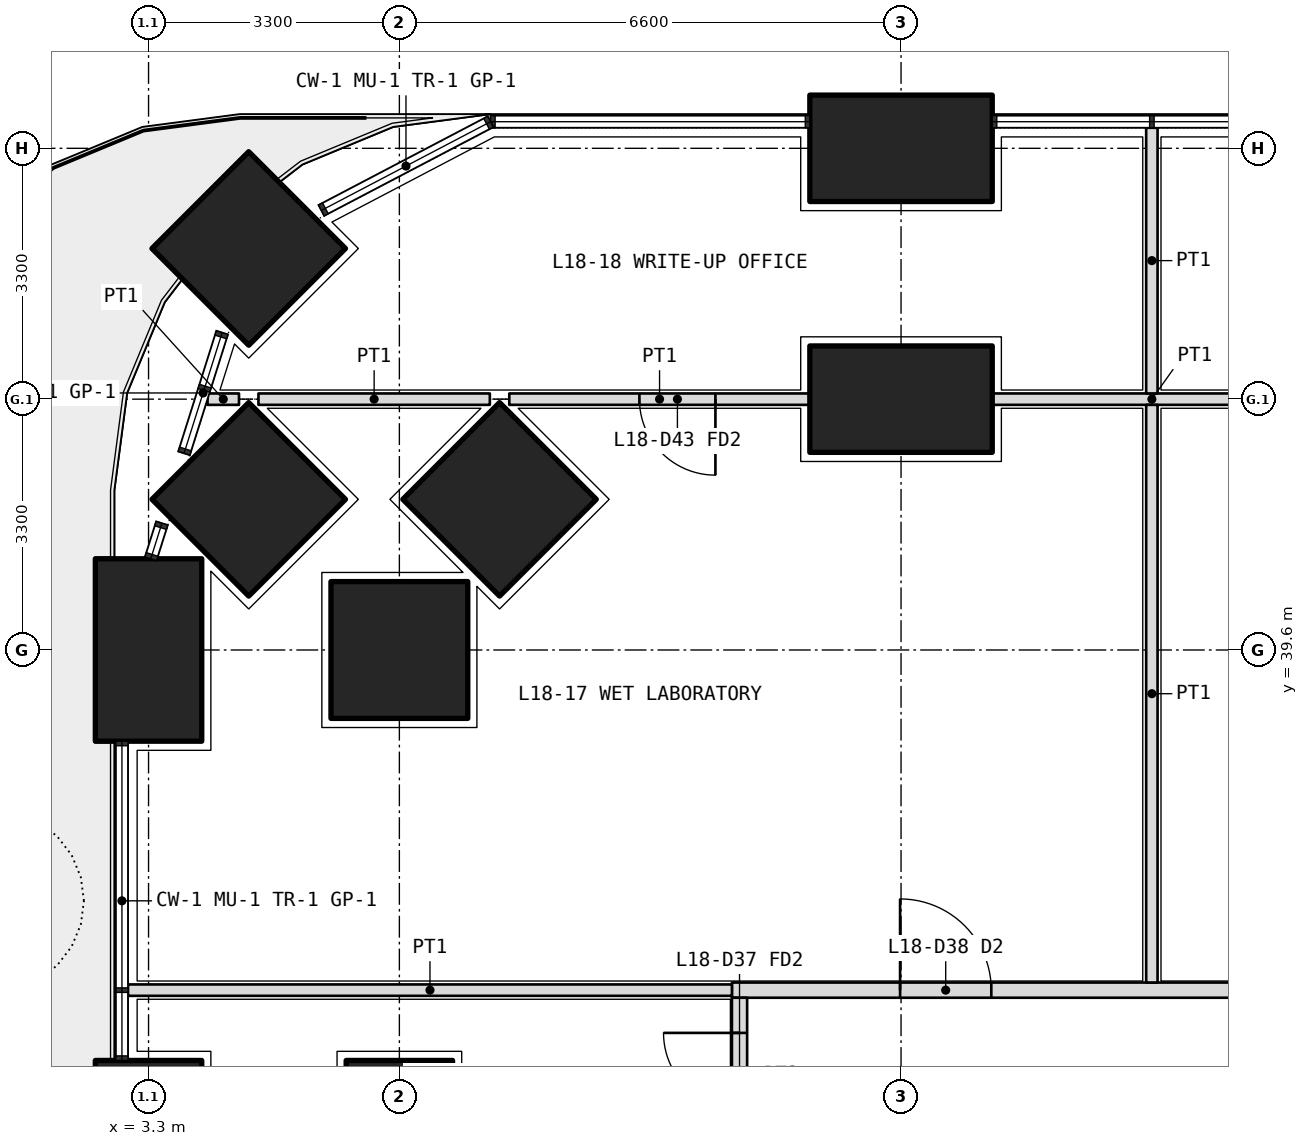
"""IFC4 building model, lengths in metres.
Left out: names, types, materials, properties, quantities, classifications, styles, units other than length and angle.
Written with IfcOpenShell. Run it as: python <this file> out.ifc"""

import sys

from ifc_helpers import new_model, si_unit, direction, frame, frame_2d, origin, origin_2d, place, context, subcontext, project, spatial, rectangle, extrude, element, fill, save


model = new_model("IFC4")
c1 = context("Model", 3, precision=1e-05, world=origin(), true_north=direction((0.0, 1.0)))
c2 = subcontext(c1, "Body", "Model", "MODEL_VIEW")
j1 = project(units=[si_unit("LENGTHUNIT", "METRE"), si_unit("PLANEANGLEUNIT", "RADIAN")], contexts=[c1])
p1 = place(None, origin())
s1 = spatial("IfcSite", under=j1, at=p1, CompositionType="ELEMENT")
p2 = place(p1, origin())
s2 = spatial("IfcBuilding", under=s1, at=p2, CompositionType="ELEMENT")
p3 = place(p2, frame((0.0, 0.0, 82.2)))
s3 = spatial("IfcBuildingStorey", under=s2, at=p3, CompositionType="ELEMENT", Elevation=82.2)
p4 = place(p3, frame((4.618, 44.882, 0.0), z_axis=(0.0, 0.0, 1.0), x_axis=(0.707106781187, 0.707106781187, 0.0)))
e1 = element("IfcColumn", 1, at=p4, inside=s3, PredefinedType="COLUMN", context=c2, shape_type="SweptSolid", body=[
    extrude(rectangle(XDim=1.8, YDim=1.8, at=origin_2d()), origin(), (0.0, 0.0, 1.0), 4.2),
])
for number, where, z_axis, x_axis in (
    (2, (3.3, 33.0, 0.0), (0.0, 0.0, 1.0), (0.0, 1.0, 0.0)),
    (3, (3.3, 39.6, 0.0), (0.0, 0.0, 1.0), (0.0, 1.0, 0.0)),
    (4, (13.2, 46.2, 0.0), (0.0, 0.0, 1.0), (1.0, 0.0, 0.0)),
):
    element("IfcColumn", number, at=place(p3, frame(where, z_axis=z_axis, x_axis=x_axis)), inside=s3, PredefinedType="COLUMN", context=c2, shape_type="SweptSolid", body=[
        extrude(rectangle(XDim=2.4, YDim=1.4, at=origin_2d()), origin(), (0.0, 0.0, 1.0), 4.2),
    ])
for number, where, z_axis, x_axis in (
    (5, (6.6, 39.6, 0.0), (0.0, 0.0, 1.0), (1.0, 0.0, 0.0)),
    (6, (4.618, 41.582, 0.0), (0.0, 0.0, 1.0), (0.707, 0.707, 0.0)),
):
    element("IfcColumn", number, at=place(p3, frame(where, z_axis=z_axis, x_axis=x_axis)), inside=s3, PredefinedType="COLUMN", context=c2, shape_type="SweptSolid", body=[
        extrude(rectangle(XDim=1.8, YDim=1.8, at=origin_2d()), origin(), (0.0, 0.0, 1.0), 4.2),
    ])
p5 = place(p3, frame((13.2, 42.9, 0.0), z_axis=(0.0, 0.0, 1.0), x_axis=(1.0, 0.0, 0.0)))
e7 = element("IfcColumn", 7, at=p5, inside=s3, PredefinedType="COLUMN", context=c2, shape_type="SweptSolid", body=[
    extrude(rectangle(XDim=2.4, YDim=1.4, at=origin_2d()), origin(), (0.0, 0.0, 1.0), 4.2),
])
p6 = place(p3, frame((7.918, 41.582, 0.0), z_axis=(0.0, 0.0, 1.0), x_axis=(0.707106781187, 0.707106781187, 0.0)))
e8 = element("IfcColumn", 8, at=p6, inside=s3, PredefinedType="COLUMN", context=c2, shape_type="SweptSolid", body=[
    extrude(rectangle(XDim=1.8, YDim=1.8, at=origin_2d()), origin(), (0.0, 0.0, 1.0), 4.2),
])
p7 = place(p3, frame((6.6, 33.0, 0.0), z_axis=(0.0, 0.0, 1.0), x_axis=(0.0, 1.0, 0.0)))
e9 = element("IfcColumn", 9, at=p7, inside=s3, PredefinedType="COLUMN", context=c2, shape_type="SweptSolid", body=[
    extrude(rectangle(XDim=2.4, YDim=1.4, at=origin_2d()), origin(), (0.0, 0.0, 1.0), 4.2),
])
p8 = place(p3, frame((10.975, 35.125, 0.0), z_axis=(0.0, 0.0, 1.0), x_axis=(1.0, 0.0, 0.0)))
e10 = element("IfcWall", 10, at=p8, inside=s3, PredefinedType="PARTITIONING", context=c2, shape_type="SweptSolid", body=[
    extrude(rectangle(XDim=30.85, YDim=0.2, at=frame_2d((15.425, 0.0))), origin(), (0.0, 0.0, 1.0), 2.85),
])
p9 = place(p8, frame((2.212, 0.0, 0.0)))
e11 = element("IfcOpeningElement", 11, at=p9, cuts=e10, PredefinedType="OPENING", context=c2, shape_type="SweptSolid", body=[
    extrude(rectangle(XDim=1.2, YDim=2.1, at=frame_2d((0.6, 1.05))), frame((0.0, 0.11, 0.0), z_axis=(0.0, -1.0, 0.0), x_axis=(1.0, 0.0, 0.0)), (0.0, 0.0, 1.0), 0.22),
])
p10 = place(p8, frame((8.225, 0.0, 0.0)))
e12 = element("IfcOpeningElement", 12, at=p10, cuts=e10, PredefinedType="OPENING", context=c2, shape_type="SweptSolid", body=[
    extrude(rectangle(XDim=1.2, YDim=2.1, at=frame_2d((0.6, 1.05))), frame((0.0, 0.11, 0.0), z_axis=(0.0, -1.0, 0.0), x_axis=(1.0, 0.0, 0.0)), (0.0, 0.0, 1.0), 0.22),
])
p11 = place(p8, frame((14.825, 0.0, 0.0)))
e13 = element("IfcOpeningElement", 13, at=p11, cuts=e10, PredefinedType="OPENING", context=c2, shape_type="SweptSolid", body=[
    extrude(rectangle(XDim=1.2, YDim=2.1, at=frame_2d((0.6, 1.05))), frame((0.0, 0.11, 0.0), z_axis=(0.0, -1.0, 0.0), x_axis=(1.0, 0.0, 0.0)), (0.0, 0.0, 1.0), 0.22),
])
p12 = place(p8, frame((19.775, 0.0, 0.0)))
e14 = element("IfcOpeningElement", 14, at=p12, cuts=e10, PredefinedType="OPENING", context=c2, shape_type="SweptSolid", body=[
    extrude(rectangle(XDim=1.2, YDim=2.1, at=frame_2d((0.6, 1.05))), frame((0.0, 0.11, 0.0), z_axis=(0.0, -1.0, 0.0), x_axis=(1.0, 0.0, 0.0)), (0.0, 0.0, 1.0), 0.22),
])
p13 = place(p8, frame((25.788, 0.0, 0.0)))
e15 = element("IfcOpeningElement", 15, at=p13, cuts=e10, PredefinedType="OPENING", context=c2, shape_type="SweptSolid", body=[
    extrude(rectangle(XDim=1.2, YDim=2.1, at=frame_2d((0.6, 1.05))), frame((0.0, 0.11, 0.0), z_axis=(0.0, -1.0, 0.0), x_axis=(1.0, 0.0, 0.0)), (0.0, 0.0, 1.0), 0.22),
])
p14 = place(p3, frame((11.075, 33.0, 0.0), z_axis=(0.0, 0.0, 1.0), x_axis=(0.0, 1.0, 0.0)))
e16 = element("IfcWall", 16, at=p14, inside=s3, PredefinedType="PARTITIONING", context=c2, shape_type="SweptSolid", body=[
    extrude(rectangle(XDim=2.025, YDim=0.2, at=frame_2d((1.012, 0.0))), origin(), (0.0, 0.0, 1.0), 2.85),
])
p15 = place(p14, frame((0.562, 0.0, 0.0)))
e17 = element("IfcOpeningElement", 17, at=p15, cuts=e16, PredefinedType="OPENING", context=c2, shape_type="SweptSolid", body=[
    extrude(rectangle(XDim=1.0, YDim=2.1, at=frame_2d((0.5, 1.05))), frame((0.0, 0.11, 0.0), z_axis=(0.0, -1.0, 0.0), x_axis=(1.0, 0.0, 0.0)), (0.0, 0.0, 1.0), 0.22),
])
p16 = place(p3, frame((3.03, 35.125, 0.0), z_axis=(0.0, 0.0, 1.0), x_axis=(1.0, 0.0, 0.0)))
e18 = element("IfcWall", 18, at=p16, inside=s3, PredefinedType="PARTITIONING", context=c2, shape_type="SweptSolid", body=[
    extrude(rectangle(XDim=7.945, YDim=0.15, at=frame_2d((3.973, 0.0))), origin(), (0.0, 0.0, 1.0), 2.7),
])
p17 = place(p3, frame((18.6, 42.9, 0.0), z_axis=(0.0, 0.0, 1.0), x_axis=(-1.0, 0.0, 0.0)))
e19 = element("IfcWall", 19, at=p17, inside=s3, PredefinedType="PARTITIONING", context=c2, shape_type="SweptSolid", body=[
    extrude(rectangle(XDim=4.2, YDim=0.15, at=frame_2d((2.1, 0.0))), origin(), (0.0, 0.0, 1.0), 3.9),
])
p18 = place(p3, frame((12.0, 42.9, 0.0), z_axis=(0.0, 0.0, 1.0), x_axis=(-1.0, 0.0, 0.0)))
e20 = element("IfcWall", 20, at=p18, inside=s3, PredefinedType="PARTITIONING", context=c2, shape_type="SweptSolid", body=[
    extrude(rectangle(XDim=3.954, YDim=0.15, at=frame_2d((1.977, 0.0))), origin(), (0.0, 0.0, 1.0), 3.9),
])
p19 = place(p18, frame((1.242, 0.0, 0.0)))
e21 = element("IfcOpeningElement", 21, at=p19, cuts=e20, PredefinedType="OPENING", context=c2, shape_type="SweptSolid", body=[
    extrude(rectangle(XDim=1.0, YDim=2.1, at=frame_2d((0.5, 1.05))), frame((0.0, 0.085, 0.0), z_axis=(0.0, -1.0, 0.0), x_axis=(1.0, 0.0, 0.0)), (0.0, 0.0, 1.0), 0.17),
])
p20 = place(p3, frame((7.79, 42.9, 0.0), z_axis=(0.0, 0.0, 1.0), x_axis=(-1.0, 0.0, 0.0)))
e22 = element("IfcWall", 22, at=p20, inside=s3, PredefinedType="PARTITIONING", context=c2, shape_type="SweptSolid", body=[
    extrude(rectangle(XDim=3.044, YDim=0.15, at=frame_2d((1.522, 0.0))), origin(), (0.0, 0.0, 1.0), 2.85),
])
p21 = place(p3, frame((4.49, 42.9, 0.0), z_axis=(0.0, 0.0, 1.0), x_axis=(-1.0, 0.0, 0.0)))
e23 = element("IfcWall", 23, at=p21, inside=s3, PredefinedType="PARTITIONING", context=c2, shape_type="SweptSolid", body=[
    extrude(rectangle(XDim=0.414, YDim=0.15, at=frame_2d((0.207, 0.0))), origin(), (0.0, 0.0, 1.0), 2.7),
])
p22 = place(p3, frame((16.5, 46.47, 0.0), z_axis=(0.0, 0.0, 1.0), x_axis=(0.0, -1.0, 0.0)))
e24 = element("IfcWall", 24, at=p22, inside=s3, PredefinedType="PARTITIONING", context=c2, shape_type="SweptSolid", body=[
    extrude(rectangle(XDim=3.495, YDim=0.15, at=frame_2d((1.748, 0.0))), origin(), (0.0, 0.0, 1.0), 2.7),
])
p23 = place(p3, frame((16.5, 42.825, 0.0), z_axis=(0.0, 0.0, 1.0), x_axis=(0.0, -1.0, 0.0)))
e25 = element("IfcWall", 25, at=p23, inside=s3, PredefinedType="PARTITIONING", context=c2, shape_type="SweptSolid", body=[
    extrude(rectangle(XDim=7.6, YDim=0.15, at=frame_2d((3.8, 0.0))), origin(), (0.0, 0.0, 1.0), 3.9),
])
p24 = place(p9, origin())
e26 = element("IfcDoor", 26, at=p24, inside=s3, OperationType="DOUBLE_DOOR_SINGLE_SWING", PredefinedType="DOOR", context=c2, shape_type="SweptSolid", body=[
    extrude(rectangle(XDim=1.2, YDim=2.1, at=frame_2d((0.6, 1.05))), frame((0.0, 0.025, 0.0), z_axis=(0.0, -1.0, 0.0), x_axis=(1.0, 0.0, 0.0)), (0.0, 0.0, 1.0), 0.05),
])
fill(e11, e26)
p25 = place(p19, origin())
e27 = element("IfcDoor", 27, at=p25, inside=s3, OperationType="SINGLE_SWING_LEFT", PredefinedType="DOOR", context=c2, shape_type="SweptSolid", body=[
    extrude(rectangle(XDim=1.0, YDim=2.1, at=frame_2d((0.5, 1.05))), frame((0.0, 0.025, 0.0), z_axis=(0.0, -1.0, 0.0), x_axis=(1.0, 0.0, 0.0)), (0.0, 0.0, 1.0), 0.05),
])
fill(e21, e27)
p26 = place(p15, origin())
e28 = element("IfcDoor", 28, at=p26, inside=s3, OperationType="SINGLE_SWING_RIGHT", PredefinedType="DOOR", context=c2, shape_type="SweptSolid", body=[
    extrude(rectangle(XDim=1.0, YDim=2.1, at=frame_2d((0.5, 1.05))), frame((0.0, 0.025, 0.0), z_axis=(0.0, -1.0, 0.0), x_axis=(1.0, 0.0, 0.0)), (0.0, 0.0, 1.0), 0.05),
])
fill(e17, e28)
save(model, sys.argv[1])
